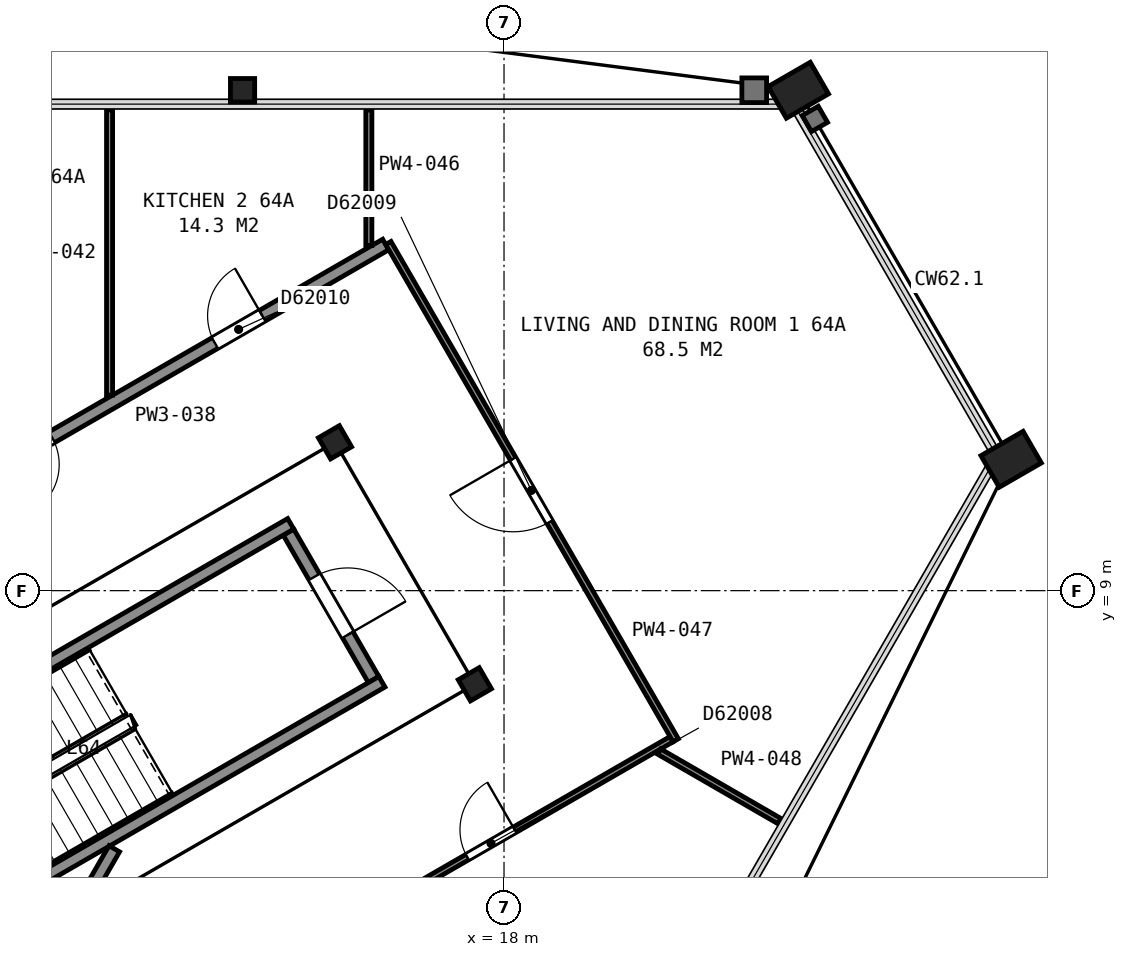
"""IFC4 building model, lengths in metres.
Left out: names, types, materials, properties, quantities, classifications, styles, units other than length and angle.
Written with IfcOpenShell. Run it as: python <this file> out.ifc"""

import sys

from ifc_helpers import new_model, si_unit, direction, frame, frame_2d, origin, origin_2d, place, context, subcontext, project, spatial, rectangle, hollow_rectangle, i_section, extrude, element, fill, save


model = new_model("IFC4")
c1 = context("Model", 3, precision=1e-05, world=origin(), true_north=direction((0.0, 1.0)))
c2 = subcontext(c1, "Body", "Model", "MODEL_VIEW")
j1 = project(units=[si_unit("LENGTHUNIT", "METRE"), si_unit("PLANEANGLEUNIT", "RADIAN")], contexts=[c1])
p1 = place(None, origin())
s1 = spatial("IfcSite", under=j1, at=p1, CompositionType="ELEMENT")
p2 = place(p1, origin())
s2 = spatial("IfcBuilding", under=s1, at=p2, CompositionType="ELEMENT")
p3 = place(p2, frame((0.0, 0.0, 254.5)))
s3 = spatial("IfcBuildingStorey", under=s2, at=p3, CompositionType="ELEMENT", Elevation=254.5)
p4 = place(p3, frame((22.84, 17.23, 0.0), z_axis=(0.0, 0.0, 1.0), x_axis=(0.5, -0.866025403784, 0.0)))
e1 = element("IfcColumn", 1, at=p4, inside=s3, PredefinedType="COLUMN", context=c2, shape_type="SweptSolid", body=[
    extrude(hollow_rectangle(XDim=0.6, YDim=0.8, WallThickness=0.05, at=origin_2d()), origin(), (0.0, 0.0, 1.0), 3.7),
])
p5 = place(p3, frame((13.7, 17.23, 0.0), z_axis=(0.0, 0.0, 1.0), x_axis=(1.0, 0.0, 0.0)))
e2 = element("IfcColumn", 2, at=p5, inside=s3, PredefinedType="COLUMN", context=c2, shape_type="SweptSolid", body=[
    extrude(i_section(OverallWidth=0.399, OverallDepth=0.386, WebThickness=0.021, FlangeThickness=0.033, FilletRadius=0.015, at=origin_2d()), origin(), (0.0, 0.0, 1.0), 3.01),
])
p6 = place(p3, frame((26.34, 11.16, 0.0), z_axis=(0.0, 0.0, 1.0), x_axis=(0.5, -0.866025403784, 0.0)))
e3 = element("IfcColumn", 3, at=p6, inside=s3, PredefinedType="COLUMN", context=c2, shape_type="SweptSolid", body=[
    extrude(hollow_rectangle(XDim=0.6, YDim=0.8, WallThickness=0.05, at=origin_2d()), origin(), (0.0, 0.0, 1.0), 3.7),
])
for number, where, z_axis, x_axis in (
    (4, (17.52, 7.46, 0.0), (0.0, 0.0, 1.0), (0.5, -0.866, 0.0)),
    (5, (15.22, 11.44, 0.0), (0.0, 0.0, 1.0), (0.5, -0.866, 0.0)),
):
    element("IfcColumn", number, at=place(p3, frame(where, z_axis=z_axis, x_axis=x_axis)), inside=s3, PredefinedType="COLUMN", context=c2, shape_type="SweptSolid", body=[
        extrude(i_section(OverallWidth=0.401, OverallDepth=0.399, WebThickness=0.025, FlangeThickness=0.04, FilletRadius=0.015, at=origin_2d()), origin(), (0.0, 0.0, 1.0), 3.65),
    ])
p7 = place(p3, frame((15.855, 7.538, 0.0), z_axis=(0.0, 0.0, 1.0), x_axis=(-0.500049511043, 0.865996816683, 0.0)))
e6 = element("IfcWall", 6, at=p7, inside=s3, PredefinedType="PARTITIONING", context=c2, shape_type="SweptSolid", body=[
    extrude(rectangle(XDim=2.8, YDim=0.2, at=frame_2d((1.4, 0.0))), origin(), (0.0, 0.0, 1.0), 3.45),
])
p8 = place(p7, frame((0.85, 0.0, 0.0)))
e7 = element("IfcOpeningElement", 7, at=p8, cuts=e6, PredefinedType="OPENING", context=c2, shape_type="SweptSolid", body=[
    extrude(rectangle(XDim=1.1, YDim=2.1, at=frame_2d((0.55, 1.05))), frame((0.0, 0.11, 0.0), z_axis=(0.0, -1.0, 0.0), x_axis=(1.0, 0.0, 0.0)), (0.0, 0.0, 1.0), 0.22),
])
for number, where, z_axis, x_axis in (
    (8, (6.178, 5.299, 0.0), (0.0, 0.0, 1.0), (0.866, 0.5, 0.0)),
    (9, (7.678, 2.701, 0.0), (0.0, 0.0, 1.0), (0.866, 0.5, 0.0)),
):
    element("IfcWall", number, at=place(p3, frame(where, z_axis=z_axis, x_axis=x_axis)), inside=s3, PredefinedType="PARTITIONING", context=c2, shape_type="SweptSolid", body=[
        extrude(rectangle(XDim=9.6, YDim=0.2, at=frame_2d((4.8, 0.0))), origin(), (0.0, 0.0, 1.0), 3.45),
    ])
p9 = place(p3, frame((9.803, 1.658, 0.0), z_axis=(0.0, 0.0, 1.0), x_axis=(0.499943114462, 0.866058244174, 0.0)))
e10 = element("IfcWall", 10, at=p9, inside=s3, PredefinedType="PARTITIONING", context=c2, shape_type="SweptSolid", body=[
    extrude(rectangle(XDim=3.576, YDim=0.2, at=frame_2d((1.788, 0.0))), origin(), (0.0, 0.0, 1.0), 3.45),
])
p10 = place(p3, frame((8.734, 10.468, 0.0), z_axis=(0.0, 0.0, 1.0), x_axis=(0.86608074249, 0.499904138298, 0.0)))
e11 = element("IfcWall", 11, at=p10, inside=s3, PredefinedType="PARTITIONING", context=c2, shape_type="SweptSolid", body=[
    extrude(rectangle(XDim=8.453, YDim=0.2, at=frame_2d((4.227, 0.0))), origin(), (0.0, 0.0, 1.0), 2.362),
])
p11 = place(p10, frame((5.209, 0.0, 0.0)))
e12 = element("IfcOpeningElement", 12, at=p11, cuts=e11, PredefinedType="OPENING", context=c2, shape_type="SweptSolid", body=[
    extrude(rectangle(XDim=0.9, YDim=2.1, at=frame_2d((0.45, 1.05))), frame((0.0, 0.11, 0.0), z_axis=(0.0, -1.0, 0.0), x_axis=(1.0, 0.0, 0.0)), (0.0, 0.0, 1.0), 0.22),
])
p12 = place(p10, frame((1.213, 0.0, 0.0)))
e13 = element("IfcOpeningElement", 13, at=p12, cuts=e11, PredefinedType="OPENING", context=c2, shape_type="SweptSolid", body=[
    extrude(rectangle(XDim=0.9, YDim=2.1, at=frame_2d((0.45, 1.05))), frame((0.0, 0.11, 0.0), z_axis=(0.0, -1.0, 0.0), x_axis=(1.0, 0.0, 0.0)), (0.0, 0.0, 1.0), 0.22),
])
p13 = place(p3, frame((11.513, 12.215, 0.0), z_axis=(0.0, 0.0, 1.0), x_axis=(0.0, 1.0, 0.0)))
e14 = element("IfcWall", 14, at=p13, inside=s3, PredefinedType="PARTITIONING", context=c2, shape_type="SweptSolid", body=[
    extrude(rectangle(XDim=4.691, YDim=0.1, at=frame_2d((2.345, 0.0))), origin(), (0.0, 0.0, 1.0), 2.362),
])
p14 = place(p3, frame((20.756, 6.557, 0.0), z_axis=(0.0, 0.0, 1.0), x_axis=(-0.86606177021, -0.499937006213, 0.0)))
e15 = element("IfcWall", 15, at=p14, inside=s3, PredefinedType="PARTITIONING", context=c2, shape_type="SweptSolid", body=[
    extrude(rectangle(XDim=8.504, YDim=0.1, at=frame_2d((4.252, 0.0))), origin(), (0.0, 0.0, 1.0), 2.362),
])
p15 = place(p14, frame((2.979, 0.0, 0.0)))
e16 = element("IfcOpeningElement", 16, at=p15, cuts=e15, PredefinedType="OPENING", context=c2, shape_type="SweptSolid", body=[
    extrude(rectangle(XDim=0.9, YDim=2.1, at=frame_2d((0.45, 1.05))), frame((0.0, 0.06, 0.0), z_axis=(0.0, -1.0, 0.0), x_axis=(1.0, 0.0, 0.0)), (0.0, 0.0, 1.0), 0.12),
])
p16 = place(p3, frame((15.777, 14.677, 0.0), z_axis=(0.0, 0.0, 1.0), x_axis=(0.0, 1.0, 0.0)))
e17 = element("IfcWall", 17, at=p16, inside=s3, PredefinedType="PARTITIONING", context=c2, shape_type="SweptSolid", body=[
    extrude(rectangle(XDim=2.229, YDim=0.1, at=frame_2d((1.114, 0.0))), origin(), (0.0, 0.0, 1.0), 2.362),
])
p17 = place(p3, frame((16.098, 14.718, 0.0), z_axis=(0.0, 0.0, 1.0), x_axis=(0.50030257167, -0.86585064346, 0.0)))
e18 = element("IfcWall", 18, at=p17, inside=s3, PredefinedType="PARTITIONING", context=c2, shape_type="SweptSolid", body=[
    extrude(rectangle(XDim=9.447, YDim=0.1, at=frame_2d((4.723, 0.0))), origin(), (0.0, 0.0, 1.0), 2.362),
])
p18 = place(p17, frame((4.1, 0.0, 0.0)))
e19 = element("IfcOpeningElement", 19, at=p18, cuts=e18, PredefinedType="OPENING", context=c2, shape_type="SweptSolid", body=[
    extrude(rectangle(XDim=1.2, YDim=2.1, at=frame_2d((0.6, 1.05))), frame((0.0, 0.06, 0.0), z_axis=(0.0, -1.0, 0.0), x_axis=(1.0, 0.0, 0.0)), (0.0, 0.0, 1.0), 0.12),
])
p19 = place(p3, frame((20.552, 6.353, 0.0), z_axis=(0.0, 0.0, 1.0), x_axis=(0.865865073245, -0.500277597875, 0.0)))
e20 = element("IfcWall", 20, at=p19, inside=s3, PredefinedType="PARTITIONING", context=c2, shape_type="SweptSolid", body=[
    extrude(rectangle(XDim=2.284, YDim=0.1, at=frame_2d((1.142, 0.0))), origin(), (0.0, 0.0, 1.0), 2.362),
])
p20 = place(p8, origin())
e21 = element("IfcDoor", 21, at=p20, inside=s3, OperationType="SINGLE_SWING_LEFT", PredefinedType="DOOR", context=c2, shape_type="SweptSolid", body=[
    extrude(rectangle(XDim=1.1, YDim=2.1, at=frame_2d((0.55, 1.05))), frame((0.0, 0.025, 0.0), z_axis=(0.0, -1.0, 0.0), x_axis=(1.0, 0.0, 0.0)), (0.0, 0.0, 1.0), 0.05),
])
fill(e7, e21)
p21 = place(p11, origin())
e22 = element("IfcDoor", 22, at=p21, inside=s3, OperationType="SINGLE_SWING_RIGHT", PredefinedType="DOOR", context=c2, shape_type="SweptSolid", body=[
    extrude(rectangle(XDim=0.9, YDim=2.1, at=frame_2d((0.45, 1.05))), frame((0.0, 0.025, 0.0), z_axis=(0.0, -1.0, 0.0), x_axis=(1.0, 0.0, 0.0)), (0.0, 0.0, 1.0), 0.05),
])
fill(e12, e22)
p22 = place(p12, origin())
e23 = element("IfcDoor", 23, at=p22, inside=s3, OperationType="SINGLE_SWING_LEFT", PredefinedType="DOOR", context=c2, shape_type="SweptSolid", body=[
    extrude(rectangle(XDim=0.9, YDim=2.1, at=frame_2d((0.45, 1.05))), frame((0.0, 0.025, 0.0), z_axis=(0.0, -1.0, 0.0), x_axis=(1.0, 0.0, 0.0)), (0.0, 0.0, 1.0), 0.05),
])
fill(e13, e23)
p23 = place(p15, origin())
e24 = element("IfcDoor", 24, at=p23, inside=s3, OperationType="SINGLE_SWING_LEFT", PredefinedType="DOOR", context=c2, shape_type="SweptSolid", body=[
    extrude(rectangle(XDim=0.9, YDim=2.1, at=frame_2d((0.45, 1.05))), frame((0.0, 0.025, 0.0), z_axis=(0.0, -1.0, 0.0), x_axis=(1.0, 0.0, 0.0)), (0.0, 0.0, 1.0), 0.05),
])
fill(e16, e24)
p24 = place(p18, origin())
e25 = element("IfcDoor", 25, at=p24, inside=s3, OperationType="SINGLE_SWING_LEFT", PredefinedType="DOOR", context=c2, shape_type="SweptSolid", body=[
    extrude(rectangle(XDim=1.2, YDim=2.1, at=frame_2d((0.6, 1.05))), frame((0.0, 0.025, 0.0), z_axis=(0.0, -1.0, 0.0), x_axis=(1.0, 0.0, 0.0)), (0.0, 0.0, 1.0), 0.05),
])
fill(e19, e25)
save(model, sys.argv[1])
